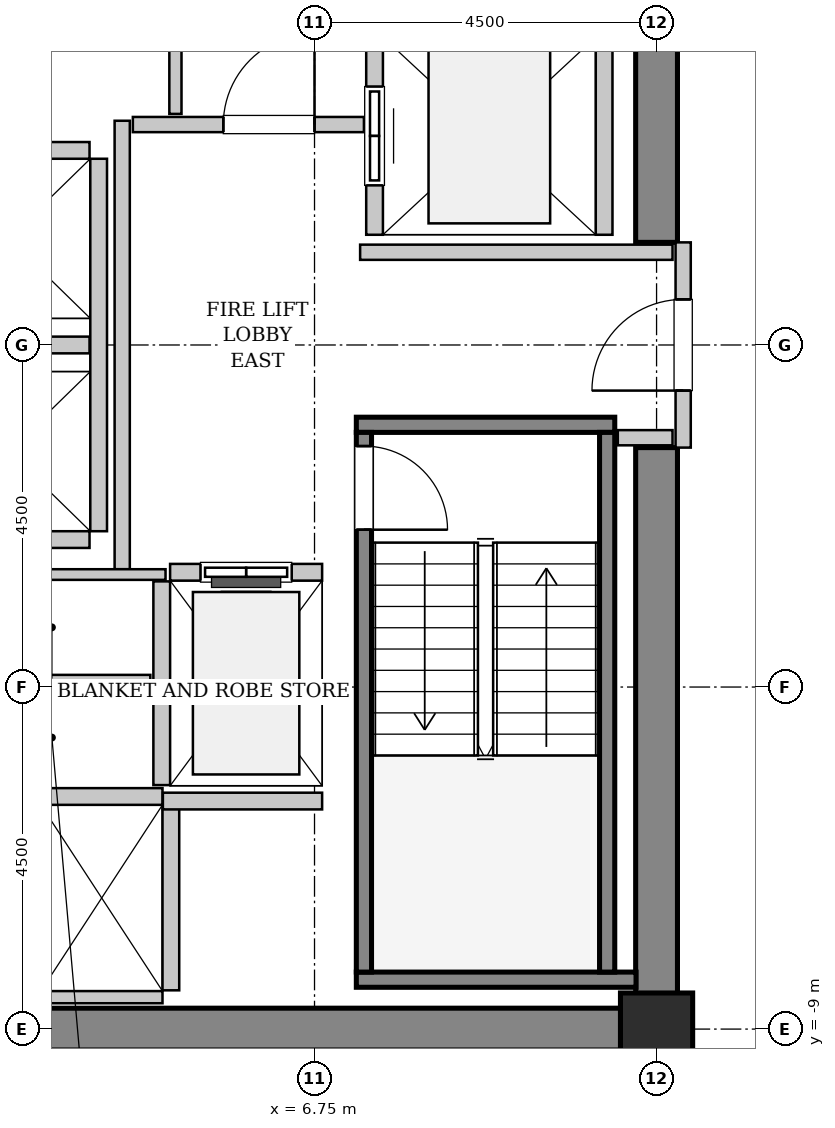
"""IFC4 building model, lengths in metres.
Left out: names, types, materials, properties, quantities, classifications, styles, units other than length and angle.
Written with IfcOpenShell. Run it as: python <this file> out.ifc"""

import sys

from ifc_helpers import new_model, si_unit, direction, frame, frame_2d, origin, origin_2d, place, context, subcontext, project, spatial, rectangle, hollow_rectangle, extrude, source, transform, mapped, element, fill, save


model = new_model("IFC4")
c1 = context("Model", 3, precision=1e-05, world=origin(), true_north=direction((0.0, 1.0)))
c2 = subcontext(c1, "Body", "Model", "MODEL_VIEW")
j1 = project(units=[si_unit("LENGTHUNIT", "METRE"), si_unit("PLANEANGLEUNIT", "RADIAN")], contexts=[c1])
p1 = place(None, origin())
s1 = spatial("IfcSite", under=j1, at=p1, CompositionType="ELEMENT")
p2 = place(p1, origin())
s2 = spatial("IfcBuilding", under=s1, at=p2, CompositionType="ELEMENT")
p3 = place(p2, frame((0.0, 0.0, 90.8)))
s3 = spatial("IfcBuildingStorey", under=s2, at=p3, CompositionType="ELEMENT", Elevation=90.8)
m1 = source(origin(), c2, "Body", "SweptSolid", [
    extrude(rectangle(XDim=9.975, YDim=0.55, at=frame_2d((4.987, 0.0))), origin(), (0.0, 0.0, 1.0), 3.8),
])
p4 = place(p3, frame((1.55, -9.0, 0.0), z_axis=(0.0, 0.0, 1.0), x_axis=(1.0, 0.0, 0.0)))
e1 = element("IfcWall", 1, at=p4, inside=s3, PredefinedType="SHEAR", context=c2, shape_type="MappedRepresentation", body=[
    mapped(m1, transform((0.0, 0.0, 0.0), x_axis=(1.0, 0.0, 0.0), y_axis=(0.0, 1.0, 0.0), z_axis=(0.0, 0.0, 1.0), scale=1.0)),
])
m2 = source(origin(), c2, "Body", "SweptSolid", [
    extrude(rectangle(XDim=7.375, YDim=0.55, at=frame_2d((3.688, 0.0))), origin(), (0.0, 0.0, 1.0), 3.8),
])
for number, where, z_axis, x_axis in (
    (2, (11.25, -8.725, 0.0), (0.0, 0.0, 1.0), (0.0, 1.0, 0.0)),
    (3, (11.25, 1.35, 0.0), (0.0, 0.0, 1.0), (0.0, 1.0, 0.0)),
):
    element("IfcWall", number, at=place(p3, frame(where, z_axis=z_axis, x_axis=x_axis)), inside=s3, PredefinedType="SHEAR", context=c2, shape_type="MappedRepresentation", body=[
        mapped(m2, transform((0.0, 0.0, 0.0), x_axis=(1.0, 0.0, 0.0), y_axis=(0.0, 1.0, 0.0), z_axis=(0.0, 0.0, 1.0), scale=1.0)),
    ])
m3 = source(origin(), c2, "Body", "SweptSolid", [
    extrude(hollow_rectangle(XDim=0.95, YDim=0.95, WallThickness=0.045, InnerFilletRadius=0.045, OuterFilletRadius=0.09, at=origin_2d()), origin(), (0.0, 0.0, 1.0), 3.8),
])
p5 = place(p3, frame((11.25, -9.0, 0.0), z_axis=(0.0, 0.0, 1.0), x_axis=(1.0, 0.0, 0.0)))
e4 = element("IfcColumn", 4, at=p5, inside=s3, PredefinedType="COLUMN", context=c2, shape_type="MappedRepresentation", body=[
    mapped(m3, transform((0.0, 0.0, 0.0), x_axis=(1.0, 0.0, 0.0), y_axis=(0.0, 1.0, 0.0), z_axis=(0.0, 0.0, 1.0), scale=1.0)),
])
m4 = source(origin(), c2, "Body", "SweptSolid", [
    extrude(rectangle(XDim=3.4, YDim=0.2, at=frame_2d((1.7, 0.0))), origin(), (0.0, 0.0, 1.0), 3.8),
])
p6 = place(p3, frame((7.3, -1.05, 0.0), z_axis=(0.0, 0.0, 1.0), x_axis=(1.0, 0.0, 0.0)))
e5 = element("IfcWall", 5, at=p6, inside=s3, PredefinedType="SOLIDWALL", context=c2, shape_type="MappedRepresentation", body=[
    mapped(m4, transform((0.0, 0.0, 0.0), x_axis=(1.0, 0.0, 0.0), y_axis=(0.0, 1.0, 0.0), z_axis=(0.0, 0.0, 1.0), scale=1.0)),
])
m5 = source(origin(), c2, "Body", "SweptSolid", [
    extrude(rectangle(XDim=3.68, YDim=0.2, at=frame_2d((1.84, 0.0))), origin(), (0.0, 0.0, 1.0), 3.8),
])
p7 = place(p3, frame((7.3, -8.35, 0.0), z_axis=(0.0, 0.0, 1.0), x_axis=(1.0, 0.0, 0.0)))
e6 = element("IfcWall", 6, at=p7, inside=s3, PredefinedType="SOLIDWALL", context=c2, shape_type="MappedRepresentation", body=[
    mapped(m5, transform((0.0, 0.0, 0.0), x_axis=(1.0, 0.0, 0.0), y_axis=(0.0, 1.0, 0.0), z_axis=(0.0, 0.0, 1.0), scale=1.0)),
])
m6 = source(origin(), c2, "Body", "SweptSolid", [
    extrude(rectangle(XDim=7.1, YDim=0.2, at=frame_2d((3.55, 0.0))), origin(), (0.0, 0.0, 1.0), 3.8),
])
p8 = place(p3, frame((7.4, -1.15, 0.0), z_axis=(0.0, 0.0, 1.0), x_axis=(0.0, -1.0, 0.0)))
e7 = element("IfcWall", 7, at=p8, inside=s3, PredefinedType="SOLIDWALL", context=c2, shape_type="MappedRepresentation", body=[
    mapped(m6, transform((0.0, 0.0, 0.0), x_axis=(1.0, 0.0, 0.0), y_axis=(0.0, 1.0, 0.0), z_axis=(0.0, 0.0, 1.0), scale=1.0)),
])
p9 = place(p8, frame((0.18, 0.0, 0.0)))
e8 = element("IfcOpeningElement", 8, at=p9, cuts=e7, PredefinedType="OPENING", context=c2, shape_type="SweptSolid", body=[
    extrude(rectangle(XDim=1.1, YDim=2.15, at=frame_2d((0.55, 1.075))), frame((0.0, 0.11, 0.0), z_axis=(0.0, -1.0, 0.0), x_axis=(1.0, 0.0, 0.0)), (0.0, 0.0, 1.0), 0.22),
])
p10 = place(p3, frame((10.6, -1.15, 0.0), z_axis=(0.0, 0.0, 1.0), x_axis=(0.0, -1.0, 0.0)))
e9 = element("IfcWall", 9, at=p10, inside=s3, PredefinedType="SOLIDWALL", context=c2, shape_type="MappedRepresentation", body=[
    mapped(m6, transform((0.0, 0.0, 0.0), x_axis=(1.0, 0.0, 0.0), y_axis=(0.0, 1.0, 0.0), z_axis=(0.0, 0.0, 1.0), scale=1.0)),
])
m7 = source(origin(), c2, "Body", "SweptSolid", [
    extrude(rectangle(XDim=2.0, YDim=0.22, at=frame_2d((1.0, 0.0))), origin(), (0.0, 0.0, 1.0), 3.535),
])
p11 = place(p3, frame((6.85, -2.99, 0.0), z_axis=(0.0, 0.0, 1.0), x_axis=(-1.0, 0.0, 0.0)))
e10 = element("IfcWall", 10, at=p11, inside=s3, PredefinedType="SOLIDWALL", context=c2, shape_type="MappedRepresentation", body=[
    mapped(m7, transform((0.0, 0.0, 0.0), x_axis=(1.0, 0.0, 0.0), y_axis=(0.0, 1.0, 0.0), z_axis=(0.0, 0.0, 1.0), scale=1.0)),
])
p12 = place(p11, frame((0.4, 0.0, 0.0)))
e11 = element("IfcOpeningElement", 11, at=p12, cuts=e10, PredefinedType="OPENING", context=c2, shape_type="SweptSolid", body=[
    extrude(rectangle(XDim=1.2, YDim=2.2, at=frame_2d((0.6, 1.1))), frame((0.0, 0.12, 0.0), z_axis=(0.0, -1.0, 0.0), x_axis=(1.0, 0.0, 0.0)), (0.0, 0.0, 1.0), 0.24),
])
m8 = source(origin(), c2, "Body", "SweptSolid", [
    extrude(rectangle(XDim=2.68, YDim=0.22, at=frame_2d((1.34, 0.0))), origin(), (0.0, 0.0, 1.0), 3.535),
])
p13 = place(p3, frame((4.74, -3.11, 0.0), z_axis=(0.0, 0.0, 1.0), x_axis=(0.0, -1.0, 0.0)))
e12 = element("IfcWall", 12, at=p13, inside=s3, PredefinedType="SOLIDWALL", context=c2, shape_type="MappedRepresentation", body=[
    mapped(m8, transform((0.0, 0.0, 0.0), x_axis=(1.0, 0.0, 0.0), y_axis=(0.0, 1.0, 0.0), z_axis=(0.0, 0.0, 1.0), scale=1.0)),
])
m9 = source(origin(), c2, "Body", "SweptSolid", [
    extrude(rectangle(XDim=5.45, YDim=0.22, at=frame_2d((2.725, 0.0))), origin(), (0.0, 0.0, 1.0), 3.535),
])
p14 = place(p3, frame((7.54, 6.9, 0.0), z_axis=(0.0, 0.0, 1.0), x_axis=(0.0, -1.0, 0.0)))
e13 = element("IfcWall", 13, at=p14, inside=s3, PredefinedType="SOLIDWALL", context=c2, shape_type="MappedRepresentation", body=[
    mapped(m9, transform((0.0, 0.0, 0.0), x_axis=(1.0, 0.0, 0.0), y_axis=(0.0, 1.0, 0.0), z_axis=(0.0, 0.0, 1.0), scale=1.0)),
])
p15 = place(p14, frame((3.5, 0.0, 0.0)))
e14 = element("IfcOpeningElement", 14, at=p15, cuts=e13, PredefinedType="OPENING", context=c2, shape_type="SweptSolid", body=[
    extrude(rectangle(XDim=1.3, YDim=2.3, at=frame_2d((0.65, 1.15))), frame((0.0, 0.12, 0.0), z_axis=(0.0, -1.0, 0.0), x_axis=(1.0, 0.0, 0.0)), (0.0, 0.0, 1.0), 0.24),
])
p16 = place(p14, frame((0.65, 0.0, 0.0)))
e15 = element("IfcOpeningElement", 15, at=p16, cuts=e13, PredefinedType="OPENING", context=c2, shape_type="SweptSolid", body=[
    extrude(rectangle(XDim=1.3, YDim=2.3, at=frame_2d((0.65, 1.15))), frame((0.0, 0.12, 0.0), z_axis=(0.0, -1.0, 0.0), x_axis=(1.0, 0.0, 0.0)), (0.0, 0.0, 1.0), 0.24),
])
p17 = place(p3, frame((10.56, 1.45, 0.0), z_axis=(0.0, 0.0, 1.0), x_axis=(0.0, 1.0, 0.0)))
e16 = element("IfcWall", 16, at=p17, inside=s3, PredefinedType="SOLIDWALL", context=c2, shape_type="MappedRepresentation", body=[
    mapped(m9, transform((0.0, 0.0, 0.0), x_axis=(1.0, 0.0, 0.0), y_axis=(0.0, 1.0, 0.0), z_axis=(0.0, 0.0, 1.0), scale=1.0)),
])
m10 = source(origin(), c2, "Body", "SweptSolid", [
    extrude(rectangle(XDim=3.2, YDim=0.22, at=frame_2d((1.6, 0.0))), origin(), (0.0, 0.0, 1.0), 3.535),
])
p18 = place(p3, frame((4.75, -5.94, 0.0), z_axis=(0.0, 0.0, 1.0), x_axis=(-1.0, 0.0, 0.0)))
e17 = element("IfcWall", 17, at=p18, inside=s3, PredefinedType="SOLIDWALL", context=c2, shape_type="MappedRepresentation", body=[
    mapped(m10, transform((0.0, 0.0, 0.0), x_axis=(1.0, 0.0, 0.0), y_axis=(0.0, 1.0, 0.0), z_axis=(0.0, 0.0, 1.0), scale=1.0)),
])
m11 = source(origin(), c2, "Body", "SweptSolid", [
    extrude(rectangle(XDim=3.2, YDim=0.16, at=frame_2d((1.6, 0.0))), origin(), (0.0, 0.0, 1.0), 2.425),
])
p19 = place(p3, frame((1.55, -8.58, 0.0), z_axis=(0.0, 0.0, 1.0), x_axis=(1.0, 0.0, 0.0)))
e18 = element("IfcWall", 18, at=p19, inside=s3, PredefinedType="PARTITIONING", context=c2, shape_type="MappedRepresentation", body=[
    mapped(m11, transform((0.0, 0.0, 0.0), x_axis=(1.0, 0.0, 0.0), y_axis=(0.0, 1.0, 0.0), z_axis=(0.0, 0.0, 1.0), scale=1.0)),
])
m12 = source(origin(), c2, "Body", "SweptSolid", [
    extrude(rectangle(XDim=2.43, YDim=0.22, at=frame_2d((1.215, 0.0))), origin(), (0.0, 0.0, 1.0), 3.535),
])
p20 = place(p3, frame((4.86, -8.49, 0.0), z_axis=(0.0, 0.0, 1.0), x_axis=(0.0, 1.0, 0.0)))
e19 = element("IfcWall", 19, at=p20, inside=s3, PredefinedType="SOLIDWALL", context=c2, shape_type="MappedRepresentation", body=[
    mapped(m12, transform((0.0, 0.0, 0.0), x_axis=(1.0, 0.0, 0.0), y_axis=(0.0, 1.0, 0.0), z_axis=(0.0, 0.0, 1.0), scale=1.0)),
])
m13 = source(origin(), c2, "Body", "SweptSolid", [
    extrude(rectangle(XDim=4.9, YDim=0.22, at=frame_2d((2.45, 0.0))), origin(), (0.0, 0.0, 1.0), 3.535),
])
p21 = place(p3, frame((3.91, -2.45, 0.0), z_axis=(0.0, 0.0, 1.0), x_axis=(0.0, 1.0, 0.0)))
e20 = element("IfcWall", 20, at=p21, inside=s3, PredefinedType="SOLIDWALL", context=c2, shape_type="MappedRepresentation", body=[
    mapped(m13, transform((0.0, 0.0, 0.0), x_axis=(1.0, 0.0, 0.0), y_axis=(0.0, 1.0, 0.0), z_axis=(0.0, 0.0, 1.0), scale=1.0)),
])
m14 = source(origin(), c2, "Body", "SweptSolid", [
    extrude(rectangle(XDim=2.13, YDim=0.22, at=frame_2d((1.065, 0.0))), origin(), (0.0, 0.0, 1.0), 3.535),
])
for number, where, z_axis, x_axis in (
    (21, (1.66, -2.56, 0.0), (0.0, 0.0, 1.0), (1.0, 0.0, 0.0)),
    (22, (1.66, 0.0, 0.0), (0.0, 0.0, 1.0), (1.0, 0.0, 0.0)),
    (23, (3.79, 2.56, 0.0), (0.0, 0.0, 1.0), (-1.0, 0.0, 0.0)),
):
    element("IfcWall", number, at=place(p3, frame(where, z_axis=z_axis, x_axis=x_axis)), inside=s3, PredefinedType="SOLIDWALL", context=c2, shape_type="MappedRepresentation", body=[
        mapped(m14, transform((0.0, 0.0, 0.0), x_axis=(1.0, 0.0, 0.0), y_axis=(0.0, 1.0, 0.0), z_axis=(0.0, 0.0, 1.0), scale=1.0)),
    ])
m15 = source(origin(), c2, "Body", "SweptSolid", [
    extrude(rectangle(XDim=2.095, YDim=0.22, at=frame_2d((1.048, 0.0))), origin(), (0.0, 0.0, 1.0), 3.535),
])
p22 = place(p3, frame((4.755, -6.0, 0.0), z_axis=(0.0, 0.0, 1.0), x_axis=(1.0, 0.0, 0.0)))
e24 = element("IfcWall", 24, at=p22, inside=s3, PredefinedType="SOLIDWALL", context=c2, shape_type="MappedRepresentation", body=[
    mapped(m15, transform((0.0, 0.0, 0.0), x_axis=(1.0, 0.0, 0.0), y_axis=(0.0, 1.0, 0.0), z_axis=(0.0, 0.0, 1.0), scale=1.0)),
])
m16 = source(origin(), c2, "Body", "SweptSolid", [
    extrude(rectangle(XDim=2.7, YDim=0.2, at=frame_2d((1.35, 0.0))), origin(), (0.0, 0.0, 1.0), 2.425),
])
p23 = place(p3, frame((11.6, -1.35, 0.0), z_axis=(0.0, 0.0, 1.0), x_axis=(0.0, 1.0, 0.0)))
e25 = element("IfcWall", 25, at=p23, inside=s3, PredefinedType="PARTITIONING", context=c2, shape_type="MappedRepresentation", body=[
    mapped(m16, transform((0.0, 0.0, 0.0), x_axis=(1.0, 0.0, 0.0), y_axis=(0.0, 1.0, 0.0), z_axis=(0.0, 0.0, 1.0), scale=1.0)),
])
p24 = place(p23, frame((0.75, 0.0, 0.0)))
e26 = element("IfcOpeningElement", 26, at=p24, cuts=e25, PredefinedType="OPENING", context=c2, shape_type="SweptSolid", body=[
    extrude(rectangle(XDim=1.2, YDim=2.15, at=frame_2d((0.6, 1.075))), frame((0.0, 0.11, 0.0), z_axis=(0.0, -1.0, 0.0), x_axis=(1.0, 0.0, 0.0)), (0.0, 0.0, 1.0), 0.22),
])
m17 = source(origin(), c2, "Body", "SweptSolid", [
    extrude(rectangle(XDim=5.9, YDim=0.2, at=frame_2d((2.95, 0.0))), origin(), (0.0, 0.0, 1.0), 3.535),
])
p25 = place(p3, frame((4.22, -2.95, 0.0), z_axis=(0.0, 0.0, 1.0), x_axis=(0.0, 1.0, 0.0)))
e27 = element("IfcWall", 27, at=p25, inside=s3, PredefinedType="PARTITIONING", context=c2, shape_type="MappedRepresentation", body=[
    mapped(m17, transform((0.0, 0.0, 0.0), x_axis=(1.0, 0.0, 0.0), y_axis=(0.0, 1.0, 0.0), z_axis=(0.0, 0.0, 1.0), scale=1.0)),
])
m18 = source(origin(), c2, "Body", "SweptSolid", [
    extrude(rectangle(XDim=3.04, YDim=0.2, at=frame_2d((1.52, 0.0))), origin(), (0.0, 0.0, 1.0), 3.535),
])
p26 = place(p3, frame((4.36, 2.9, 0.0), z_axis=(0.0, 0.0, 1.0), x_axis=(1.0, 0.0, 0.0)))
e28 = element("IfcWall", 28, at=p26, inside=s3, PredefinedType="PARTITIONING", context=c2, shape_type="MappedRepresentation", body=[
    mapped(m18, transform((0.0, 0.0, 0.0), x_axis=(1.0, 0.0, 0.0), y_axis=(0.0, 1.0, 0.0), z_axis=(0.0, 0.0, 1.0), scale=1.0)),
])
p27 = place(p26, frame((1.19, 0.0, 0.0)))
e29 = element("IfcOpeningElement", 29, at=p27, cuts=e28, PredefinedType="OPENING", context=c2, shape_type="SweptSolid", body=[
    extrude(rectangle(XDim=1.2, YDim=2.15, at=frame_2d((0.6, 1.075))), frame((0.0, 0.11, 0.0), z_axis=(0.0, -1.0, 0.0), x_axis=(1.0, 0.0, 0.0)), (0.0, 0.0, 1.0), 0.22),
])
m19 = source(origin(), c2, "Body", "SweptSolid", [
    extrude(rectangle(XDim=4.11, YDim=0.2, at=frame_2d((2.055, 0.0))), origin(), (0.0, 0.0, 1.0), 3.535),
])
p28 = place(p3, frame((7.35, 1.22, 0.0), z_axis=(0.0, 0.0, 1.0), x_axis=(1.0, 0.0, 0.0)))
e30 = element("IfcWall", 30, at=p28, inside=s3, PredefinedType="PARTITIONING", context=c2, shape_type="MappedRepresentation", body=[
    mapped(m19, transform((0.0, 0.0, 0.0), x_axis=(1.0, 0.0, 0.0), y_axis=(0.0, 1.0, 0.0), z_axis=(0.0, 0.0, 1.0), scale=1.0)),
])
m20 = source(origin(), c2, "Body", "SweptSolid", [
    extrude(rectangle(XDim=0.72, YDim=0.2, at=frame_2d((0.36, 0.0))), origin(), (0.0, 0.0, 1.0), 3.535),
])
p29 = place(p3, frame((10.74, -1.22, 0.0), z_axis=(0.0, 0.0, 1.0), x_axis=(1.0, 0.0, 0.0)))
e31 = element("IfcWall", 31, at=p29, inside=s3, PredefinedType="PARTITIONING", context=c2, shape_type="MappedRepresentation", body=[
    mapped(m20, transform((0.0, 0.0, 0.0), x_axis=(1.0, 0.0, 0.0), y_axis=(0.0, 1.0, 0.0), z_axis=(0.0, 0.0, 1.0), scale=1.0)),
])
m21 = source(origin(), c2, "Body", "SweptSolid", [
    extrude(rectangle(XDim=3.015, YDim=0.16, at=frame_2d((1.507, 0.0))), origin(), (0.0, 0.0, 1.0), 3.535),
])
p30 = place(p3, frame((4.92, 3.04, 0.0), z_axis=(0.0, 0.0, 1.0), x_axis=(0.0, 1.0, 0.0)))
e32 = element("IfcWall", 32, at=p30, inside=s3, PredefinedType="PARTITIONING", context=c2, shape_type="MappedRepresentation", body=[
    mapped(m21, transform((0.0, 0.0, 0.0), x_axis=(1.0, 0.0, 0.0), y_axis=(0.0, 1.0, 0.0), z_axis=(0.0, 0.0, 1.0), scale=1.0)),
])
m22 = source(origin(), c2, "Body", "SweptSolid", [
    extrude(rectangle(XDim=3.15, YDim=0.14, at=frame_2d((1.575, 0.0))), origin(), (0.0, 0.0, 1.0), 3.535),
])
p31 = place(p3, frame((1.64, -3.02, 0.0), z_axis=(0.0, 0.0, 1.0), x_axis=(1.0, 0.0, 0.0)))
e33 = element("IfcWall", 33, at=p31, inside=s3, PredefinedType="PARTITIONING", context=c2, shape_type="MappedRepresentation", body=[
    mapped(m22, transform((0.0, 0.0, 0.0), x_axis=(1.0, 0.0, 0.0), y_axis=(0.0, 1.0, 0.0), z_axis=(0.0, 0.0, 1.0), scale=1.0)),
])
m23 = source(origin(), c2, "Body", "SweptSolid", [
    extrude(rectangle(XDim=2.95, YDim=0.14, at=frame_2d((1.475, 0.0))), origin(), (0.0, 0.0, 1.0), 3.535),
])
p32 = place(p3, frame((1.64, -4.41, 0.0), z_axis=(0.0, 0.0, 1.0), x_axis=(1.0, 0.0, 0.0)))
e34 = element("IfcWall", 34, at=p32, inside=s3, PredefinedType="PARTITIONING", context=c2, shape_type="MappedRepresentation", body=[
    mapped(m23, transform((0.0, 0.0, 0.0), x_axis=(1.0, 0.0, 0.0), y_axis=(0.0, 1.0, 0.0), z_axis=(0.0, 0.0, 1.0), scale=1.0)),
])
m24 = source(origin(), c2, "Body", "SweptSolid", [
    extrude(rectangle(XDim=1.1, YDim=2.15, at=frame_2d((0.55, 1.075))), frame((0.0, 0.025, 0.0), z_axis=(0.0, -1.0, 0.0), x_axis=(1.0, 0.0, 0.0)), (0.0, 0.0, 1.0), 0.05),
])
p33 = place(p9, origin())
e35 = element("IfcDoor", 35, at=p33, inside=s3, OperationType="SINGLE_SWING_RIGHT", PredefinedType="DOOR", context=c2, shape_type="MappedRepresentation", body=[
    mapped(m24, transform((0.0, 0.0, 0.0), x_axis=(1.0, 0.0, 0.0), y_axis=(0.0, 1.0, 0.0), z_axis=(0.0, 0.0, 1.0), scale=1.0)),
])
fill(e8, e35)
m25 = source(origin(), c2, "Body", "SweptSolid", [
    extrude(rectangle(XDim=1.2, YDim=2.2, at=frame_2d((0.6, 1.1))), frame((0.0, 0.025, 0.0), z_axis=(0.0, -1.0, 0.0), x_axis=(1.0, 0.0, 0.0)), (0.0, 0.0, 1.0), 0.05),
])
p34 = place(p12, origin())
e36 = element("IfcDoor", 36, at=p34, inside=s3, OperationType="SLIDING_TO_LEFT", PredefinedType="DOOR", context=c2, shape_type="MappedRepresentation", body=[
    mapped(m25, transform((0.0, 0.0, 0.0), x_axis=(1.0, 0.0, 0.0), y_axis=(0.0, 1.0, 0.0), z_axis=(0.0, 0.0, 1.0), scale=1.0)),
])
fill(e11, e36)
m26 = source(origin(), c2, "Body", "SweptSolid", [
    extrude(rectangle(XDim=1.3, YDim=2.3, at=frame_2d((0.65, 1.15))), frame((0.0, 0.025, 0.0), z_axis=(0.0, -1.0, 0.0), x_axis=(1.0, 0.0, 0.0)), (0.0, 0.0, 1.0), 0.05),
])
p35 = place(p15, origin())
e37 = element("IfcDoor", 37, at=p35, inside=s3, OperationType="SLIDING_TO_RIGHT", PredefinedType="DOOR", context=c2, shape_type="MappedRepresentation", body=[
    mapped(m26, transform((0.0, 0.0, 0.0), x_axis=(1.0, 0.0, 0.0), y_axis=(0.0, 1.0, 0.0), z_axis=(0.0, 0.0, 1.0), scale=1.0)),
])
fill(e14, e37)
m27 = source(origin(), c2, "Body", "SweptSolid", [
    extrude(rectangle(XDim=1.2, YDim=2.15, at=frame_2d((0.6, 1.075))), frame((0.0, 0.025, 0.0), z_axis=(0.0, -1.0, 0.0), x_axis=(1.0, 0.0, 0.0)), (0.0, 0.0, 1.0), 0.05),
])
p36 = place(p24, origin())
e38 = element("IfcDoor", 38, at=p36, inside=s3, OperationType="SINGLE_SWING_LEFT", PredefinedType="DOOR", context=c2, shape_type="MappedRepresentation", body=[
    mapped(m27, transform((0.0, 0.0, 0.0), x_axis=(1.0, 0.0, 0.0), y_axis=(0.0, 1.0, 0.0), z_axis=(0.0, 0.0, 1.0), scale=1.0)),
])
fill(e26, e38)
p37 = place(p27, origin())
e39 = element("IfcDoor", 39, at=p37, inside=s3, OperationType="SINGLE_SWING_RIGHT", PredefinedType="DOOR", context=c2, shape_type="MappedRepresentation", body=[
    mapped(m27, transform((0.0, 0.0, 0.0), x_axis=(1.0, 0.0, 0.0), y_axis=(0.0, 1.0, 0.0), z_axis=(0.0, 0.0, 1.0), scale=1.0)),
])
fill(e29, e39)
save(model, sys.argv[1])
